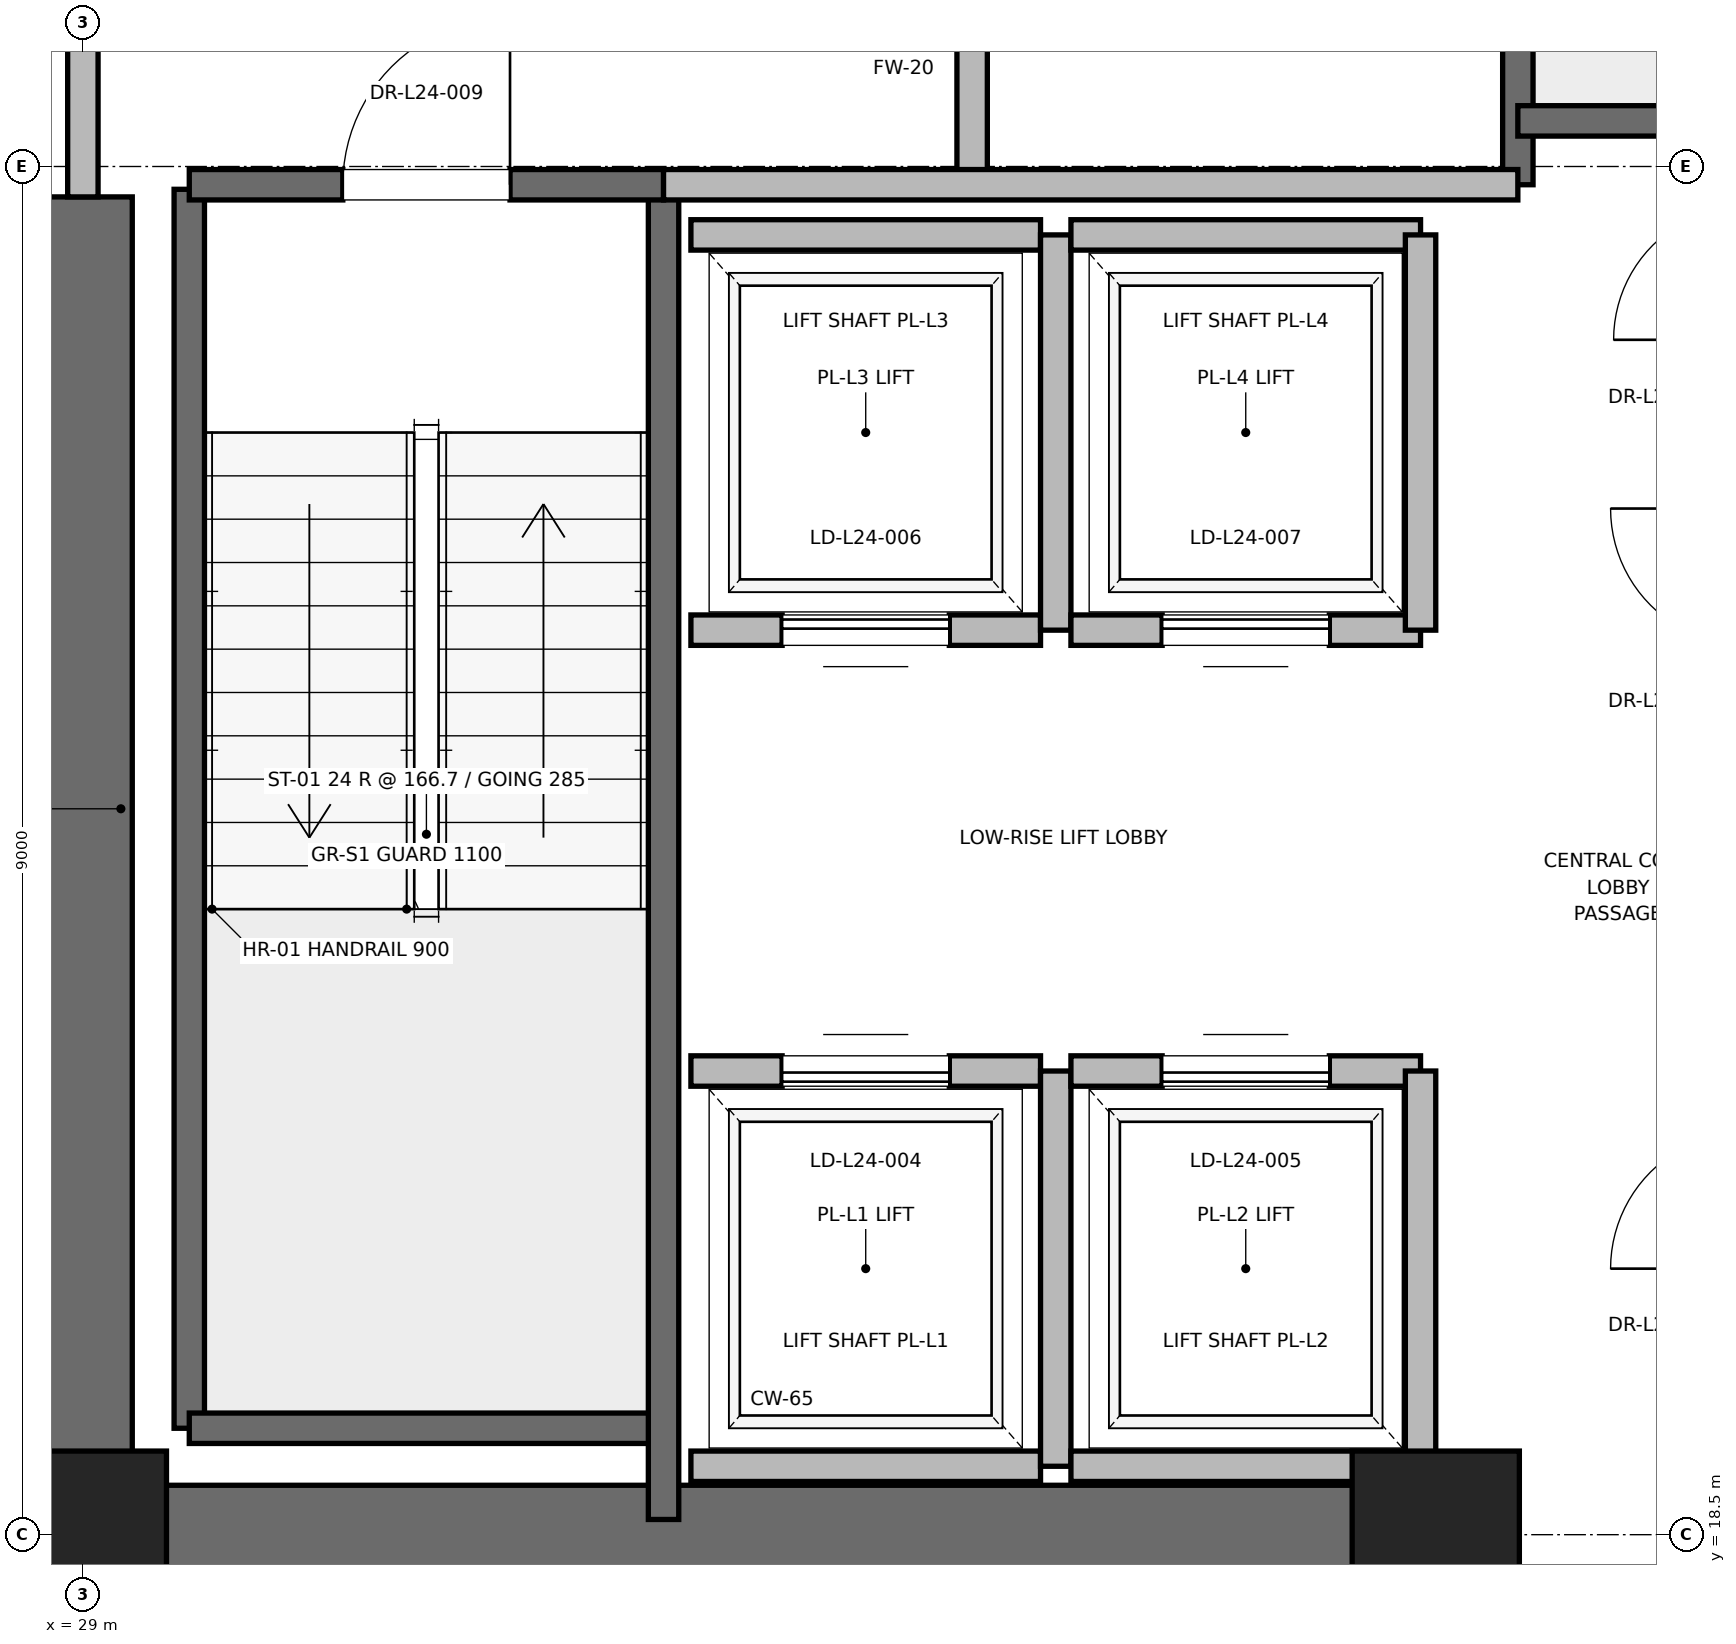
"""IFC4 building model, lengths in metres.
Left out: names, types, materials, properties, quantities, classifications, styles, units other than length and angle.
Written with IfcOpenShell. Run it as: python <this file> out.ifc"""

import sys

from ifc_helpers import new_model, si_unit, direction, frame, frame_2d, origin, origin_2d, place, context, subcontext, project, spatial, rectangle, extrude, element, fill, save


model = new_model("IFC4")
c1 = context("Model", 3, precision=1e-05, world=origin(), true_north=direction((0.0, 1.0)))
c2 = subcontext(c1, "Body", "Model", "MODEL_VIEW")
j1 = project(units=[si_unit("LENGTHUNIT", "METRE"), si_unit("PLANEANGLEUNIT", "RADIAN")], contexts=[c1])
p1 = place(None, origin())
s1 = spatial("IfcSite", under=j1, at=p1, CompositionType="ELEMENT")
p2 = place(p1, origin())
s2 = spatial("IfcBuilding", under=s1, at=p2, CompositionType="ELEMENT")
p3 = place(p2, frame((0.0, 0.0, 103.6)))
s3 = spatial("IfcBuildingStorey", under=s2, at=p3, CompositionType="ELEMENT", Elevation=103.6)
for number, where, z_axis, x_axis in (
    (1, (29.0, 18.5, 0.0), (0.0, 0.0, 1.0), (1.0, 0.0, 0.0)),
    (2, (37.9, 18.5, 0.0), (0.0, 0.0, 1.0), (1.0, 0.0, 0.0)),
):
    element("IfcColumn", number, at=place(p3, frame(where, z_axis=z_axis, x_axis=x_axis)), inside=s3, PredefinedType="PILASTER", context=c2, shape_type="SweptSolid", body=[
        extrude(rectangle(XDim=1.1, YDim=1.1, at=origin_2d()), origin(), (0.0, 0.0, 1.0), 4.0),
    ])
p4 = place(p3, frame((29.0, 18.5, 0.0), z_axis=(0.0, 0.0, 1.0), x_axis=(1.0, 0.0, 0.0)))
e3 = element("IfcWall", 3, at=p4, inside=s3, PredefinedType="SHEAR", context=c2, shape_type="SweptSolid", body=[
    extrude(rectangle(XDim=9.2, YDim=0.65, at=frame_2d((4.6, 0.0))), origin(), (0.0, 0.0, 1.0), 3.7),
])
p5 = place(p3, frame((29.0, 18.5, 0.0), z_axis=(0.0, 0.0, 1.0), x_axis=(0.0, 1.0, 0.0)))
e4 = element("IfcWall", 4, at=p5, inside=s3, PredefinedType="SHEAR", context=c2, shape_type="SweptSolid", body=[
    extrude(rectangle(XDim=8.8, YDim=0.65, at=frame_2d((4.4, 0.0))), origin(), (0.0, 0.0, 1.0), 3.7),
])
p6 = place(p3, frame((29.7, 19.2, 0.0), z_axis=(0.0, 0.0, 1.0), x_axis=(0.0, 1.0, 0.0)))
e5 = element("IfcWall", 5, at=p6, inside=s3, PredefinedType="SOLIDWALL", context=c2, shape_type="SweptSolid", body=[
    extrude(rectangle(XDim=8.15, YDim=0.2, at=frame_2d((4.075, 0.0))), origin(), (0.0, 0.0, 1.0), 3.7),
])
p7 = place(p3, frame((29.7, 19.2, 0.0), z_axis=(0.0, 0.0, 1.0), x_axis=(1.0, 0.0, 0.0)))
e6 = element("IfcWall", 6, at=p7, inside=s3, PredefinedType="SOLIDWALL", context=c2, shape_type="SweptSolid", body=[
    extrude(rectangle(XDim=3.12, YDim=0.2, at=frame_2d((1.56, 0.0))), origin(), (0.0, 0.0, 1.0), 3.7),
])
p8 = place(p3, frame((32.82, 18.6, 0.0), z_axis=(0.0, 0.0, 1.0), x_axis=(0.0, 1.0, 0.0)))
e7 = element("IfcWall", 7, at=p8, inside=s3, PredefinedType="SOLIDWALL", context=c2, shape_type="SweptSolid", body=[
    extrude(rectangle(XDim=8.78, YDim=0.2, at=frame_2d((4.39, 0.0))), origin(), (0.0, 0.0, 1.0), 3.7),
])
p9 = place(p3, frame((29.7, 27.38, 0.0), z_axis=(0.0, 0.0, 1.0), x_axis=(1.0, 0.0, 0.0)))
e8 = element("IfcWall", 8, at=p9, inside=s3, PredefinedType="SOLIDWALL", context=c2, shape_type="SweptSolid", body=[
    extrude(rectangle(XDim=3.12, YDim=0.2, at=frame_2d((1.56, 0.0))), origin(), (0.0, 0.0, 1.0), 3.7),
])
p10 = place(p9, frame((1.01, 0.0, 0.0)))
e9 = element("IfcOpeningElement", 9, at=p10, cuts=e8, PredefinedType="OPENING", context=c2, shape_type="SweptSolid", body=[
    extrude(rectangle(XDim=1.1, YDim=2.15, at=frame_2d((0.55, 1.075))), frame((0.0, 0.1, 0.0), z_axis=(0.0, -1.0, 0.0), x_axis=(1.0, 0.0, 0.0)), (0.0, 0.0, 1.0), 0.2),
])
p11 = place(p3, frame((38.44, 27.38, 0.0), z_axis=(0.0, 0.0, 1.0), x_axis=(0.0, 1.0, 0.0)))
e10 = element("IfcWall", 10, at=p11, inside=s3, PredefinedType="SOLIDWALL", context=c2, shape_type="SweptSolid", body=[
    extrude(rectangle(XDim=8.87, YDim=0.2, at=frame_2d((4.435, 0.0))), origin(), (0.0, 0.0, 1.0), 3.7),
])
p12 = place(p3, frame((38.44, 27.8, 0.0), z_axis=(0.0, 0.0, 1.0), x_axis=(1.0, 0.0, 0.0)))
e11 = element("IfcWall", 11, at=p12, inside=s3, PredefinedType="SOLIDWALL", context=c2, shape_type="SweptSolid", body=[
    extrude(rectangle(XDim=3.32, YDim=0.2, at=frame_2d((1.66, 0.0))), origin(), (0.0, 0.0, 1.0), 3.7),
])
p13 = place(p3, frame((34.85, 27.38, 0.0), z_axis=(0.0, 0.0, 1.0), x_axis=(0.0, 1.0, 0.0)))
e12 = element("IfcWall", 12, at=p13, inside=s3, PredefinedType="PARTITIONING", context=c2, shape_type="SweptSolid", body=[
    extrude(rectangle(XDim=3.37, YDim=0.2, at=frame_2d((1.685, 0.0))), origin(), (0.0, 0.0, 1.0), 3.7),
])
p14 = place(p13, frame((1.11, 0.0, 0.0)))
e13 = element("IfcOpeningElement", 13, at=p14, cuts=e12, PredefinedType="OPENING", context=c2, shape_type="SweptSolid", body=[
    extrude(rectangle(XDim=1.15, YDim=2.2, at=frame_2d((0.575, 1.1))), frame((0.0, 0.1, 0.0), z_axis=(0.0, -1.0, 0.0), x_axis=(1.0, 0.0, 0.0)), (0.0, 0.0, 1.0), 0.2),
])
p15 = place(p3, frame((29.0, 27.3, 0.0), z_axis=(0.0, 0.0, 1.0), x_axis=(0.0, 1.0, 0.0)))
e14 = element("IfcWall", 14, at=p15, inside=s3, PredefinedType="PARTITIONING", context=c2, shape_type="SweptSolid", body=[
    extrude(rectangle(XDim=3.4, YDim=0.2, at=frame_2d((1.7, 0.0))), origin(), (0.0, 0.0, 1.0), 2.48),
])
p16 = place(p15, frame((1.125, 0.0, 0.0)))
e15 = element("IfcOpeningElement", 15, at=p16, cuts=e14, PredefinedType="OPENING", context=c2, shape_type="SweptSolid", body=[
    extrude(rectangle(XDim=1.15, YDim=2.2, at=frame_2d((0.575, 1.1))), frame((0.0, 0.1, 0.0), z_axis=(0.0, -1.0, 0.0), x_axis=(1.0, 0.0, 0.0)), (0.0, 0.0, 1.0), 0.2),
])
p17 = place(p3, frame((32.82, 27.38, 0.0), z_axis=(0.0, 0.0, 1.0), x_axis=(1.0, 0.0, 0.0)))
e16 = element("IfcWall", 16, at=p17, inside=s3, PredefinedType="PARTITIONING", context=c2, shape_type="SweptSolid", body=[
    extrude(rectangle(XDim=5.62, YDim=0.2, at=frame_2d((2.81, 0.0))), origin(), (0.0, 0.0, 1.0), 3.7),
])
p18 = place(p3, frame((33.0, 18.95, 0.0), z_axis=(0.0, 0.0, 1.0), x_axis=(1.0, 0.0, 0.0)))
e17 = element("IfcWall", 17, at=p18, inside=s3, PredefinedType="SOLIDWALL", context=c2, shape_type="SweptSolid", body=[
    extrude(rectangle(XDim=2.3, YDim=0.2, at=frame_2d((1.15, 0.0))), origin(), (0.0, 0.0, 1.0), 3.7),
])
p19 = place(p3, frame((35.3, 21.55, 0.0), z_axis=(0.0, 0.0, 1.0), x_axis=(-1.0, 0.0, 0.0)))
e18 = element("IfcWall", 18, at=p19, inside=s3, PredefinedType="SOLIDWALL", context=c2, shape_type="SweptSolid", body=[
    extrude(rectangle(XDim=2.3, YDim=0.2, at=frame_2d((1.15, 0.0))), origin(), (0.0, 0.0, 1.0), 3.7),
])
p20 = place(p19, frame((0.6, 0.0, 0.0)))
e19 = element("IfcOpeningElement", 19, at=p20, cuts=e18, PredefinedType="OPENING", context=c2, shape_type="SweptSolid", body=[
    extrude(rectangle(XDim=1.1, YDim=2.2, at=frame_2d((0.55, 1.1))), frame((0.0, 0.1, 0.0), z_axis=(0.0, -1.0, 0.0), x_axis=(1.0, 0.0, 0.0)), (0.0, 0.0, 1.0), 0.2),
])
p21 = place(p3, frame((35.4, 18.95, 0.0), z_axis=(0.0, 0.0, 1.0), x_axis=(0.0, 1.0, 0.0)))
e20 = element("IfcWall", 20, at=p21, inside=s3, PredefinedType="SOLIDWALL", context=c2, shape_type="SweptSolid", body=[
    extrude(rectangle(XDim=2.6, YDim=0.2, at=frame_2d((1.3, 0.0))), origin(), (0.0, 0.0, 1.0), 3.7),
])
p22 = place(p3, frame((35.5, 18.95, 0.0), z_axis=(0.0, 0.0, 1.0), x_axis=(1.0, 0.0, 0.0)))
e21 = element("IfcWall", 21, at=p22, inside=s3, PredefinedType="SOLIDWALL", context=c2, shape_type="SweptSolid", body=[
    extrude(rectangle(XDim=2.3, YDim=0.2, at=frame_2d((1.15, 0.0))), origin(), (0.0, 0.0, 1.0), 2.48),
])
p23 = place(p3, frame((37.8, 21.55, 0.0), z_axis=(0.0, 0.0, 1.0), x_axis=(-1.0, 0.0, 0.0)))
e22 = element("IfcWall", 22, at=p23, inside=s3, PredefinedType="SOLIDWALL", context=c2, shape_type="SweptSolid", body=[
    extrude(rectangle(XDim=2.3, YDim=0.2, at=frame_2d((1.15, 0.0))), origin(), (0.0, 0.0, 1.0), 3.7),
])
p24 = place(p23, frame((0.6, 0.0, 0.0)))
e23 = element("IfcOpeningElement", 23, at=p24, cuts=e22, PredefinedType="OPENING", context=c2, shape_type="SweptSolid", body=[
    extrude(rectangle(XDim=1.1, YDim=2.2, at=frame_2d((0.55, 1.1))), frame((0.0, 0.1, 0.0), z_axis=(0.0, -1.0, 0.0), x_axis=(1.0, 0.0, 0.0)), (0.0, 0.0, 1.0), 0.2),
])
p25 = place(p3, frame((37.8, 18.95, 0.0), z_axis=(0.0, 0.0, 1.0), x_axis=(0.0, 1.0, 0.0)))
e24 = element("IfcWall", 24, at=p25, inside=s3, PredefinedType="SOLIDWALL", context=c2, shape_type="SweptSolid", body=[
    extrude(rectangle(XDim=2.6, YDim=0.2, at=frame_2d((1.3, 0.0))), origin(), (0.0, 0.0, 1.0), 2.48),
])
p26 = place(p3, frame((33.0, 24.45, 0.0), z_axis=(0.0, 0.0, 1.0), x_axis=(1.0, 0.0, 0.0)))
e25 = element("IfcWall", 25, at=p26, inside=s3, PredefinedType="SOLIDWALL", context=c2, shape_type="SweptSolid", body=[
    extrude(rectangle(XDim=2.3, YDim=0.2, at=frame_2d((1.15, 0.0))), origin(), (0.0, 0.0, 1.0), 3.7),
])
p27 = place(p26, frame((0.6, 0.0, 0.0)))
e26 = element("IfcOpeningElement", 26, at=p27, cuts=e25, PredefinedType="OPENING", context=c2, shape_type="SweptSolid", body=[
    extrude(rectangle(XDim=1.1, YDim=2.2, at=frame_2d((0.55, 1.1))), frame((0.0, 0.1, 0.0), z_axis=(0.0, -1.0, 0.0), x_axis=(1.0, 0.0, 0.0)), (0.0, 0.0, 1.0), 0.2),
])
p28 = place(p3, frame((35.3, 27.05, 0.0), z_axis=(0.0, 0.0, 1.0), x_axis=(-1.0, 0.0, 0.0)))
e27 = element("IfcWall", 27, at=p28, inside=s3, PredefinedType="SOLIDWALL", context=c2, shape_type="SweptSolid", body=[
    extrude(rectangle(XDim=2.3, YDim=0.2, at=frame_2d((1.15, 0.0))), origin(), (0.0, 0.0, 1.0), 3.7),
])
p29 = place(p3, frame((35.4, 24.45, 0.0), z_axis=(0.0, 0.0, 1.0), x_axis=(0.0, 1.0, 0.0)))
e28 = element("IfcWall", 28, at=p29, inside=s3, PredefinedType="SOLIDWALL", context=c2, shape_type="SweptSolid", body=[
    extrude(rectangle(XDim=2.6, YDim=0.2, at=frame_2d((1.3, 0.0))), origin(), (0.0, 0.0, 1.0), 3.7),
])
p30 = place(p3, frame((35.5, 24.45, 0.0), z_axis=(0.0, 0.0, 1.0), x_axis=(1.0, 0.0, 0.0)))
e29 = element("IfcWall", 29, at=p30, inside=s3, PredefinedType="SOLIDWALL", context=c2, shape_type="SweptSolid", body=[
    extrude(rectangle(XDim=2.3, YDim=0.2, at=frame_2d((1.15, 0.0))), origin(), (0.0, 0.0, 1.0), 3.7),
])
p31 = place(p30, frame((0.6, 0.0, 0.0)))
e30 = element("IfcOpeningElement", 30, at=p31, cuts=e29, PredefinedType="OPENING", context=c2, shape_type="SweptSolid", body=[
    extrude(rectangle(XDim=1.1, YDim=2.2, at=frame_2d((0.55, 1.1))), frame((0.0, 0.1, 0.0), z_axis=(0.0, -1.0, 0.0), x_axis=(1.0, 0.0, 0.0)), (0.0, 0.0, 1.0), 0.2),
])
p32 = place(p3, frame((37.8, 27.05, 0.0), z_axis=(0.0, 0.0, 1.0), x_axis=(-1.0, 0.0, 0.0)))
e31 = element("IfcWall", 31, at=p32, inside=s3, PredefinedType="SOLIDWALL", context=c2, shape_type="SweptSolid", body=[
    extrude(rectangle(XDim=2.3, YDim=0.2, at=frame_2d((1.15, 0.0))), origin(), (0.0, 0.0, 1.0), 3.7),
])
p33 = place(p3, frame((37.8, 24.45, 0.0), z_axis=(0.0, 0.0, 1.0), x_axis=(0.0, 1.0, 0.0)))
e32 = element("IfcWall", 32, at=p33, inside=s3, PredefinedType="SOLIDWALL", context=c2, shape_type="SweptSolid", body=[
    extrude(rectangle(XDim=2.6, YDim=0.2, at=frame_2d((1.3, 0.0))), origin(), (0.0, 0.0, 1.0), 3.7),
])
p34 = place(p10, origin())
e33 = element("IfcDoor", 33, at=p34, inside=s3, OperationType="SINGLE_SWING_RIGHT", PredefinedType="DOOR", context=c2, shape_type="SweptSolid", body=[
    extrude(rectangle(XDim=1.1, YDim=2.15, at=frame_2d((0.55, 1.075))), frame((0.0, 0.025, 0.0), z_axis=(0.0, -1.0, 0.0), x_axis=(1.0, 0.0, 0.0)), (0.0, 0.0, 1.0), 0.05),
])
fill(e9, e33)
p35 = place(p20, origin())
e34 = element("IfcDoor", 34, at=p35, inside=s3, OperationType="SLIDING_TO_RIGHT", PredefinedType="DOOR", context=c2, shape_type="SweptSolid", body=[
    extrude(rectangle(XDim=1.1, YDim=2.2, at=frame_2d((0.55, 1.1))), frame((0.0, 0.025, 0.0), z_axis=(0.0, -1.0, 0.0), x_axis=(1.0, 0.0, 0.0)), (0.0, 0.0, 1.0), 0.05),
])
fill(e19, e34)
p36 = place(p24, origin())
e35 = element("IfcDoor", 35, at=p36, inside=s3, OperationType="SLIDING_TO_RIGHT", PredefinedType="DOOR", context=c2, shape_type="SweptSolid", body=[
    extrude(rectangle(XDim=1.1, YDim=2.2, at=frame_2d((0.55, 1.1))), frame((0.0, 0.025, 0.0), z_axis=(0.0, -1.0, 0.0), x_axis=(1.0, 0.0, 0.0)), (0.0, 0.0, 1.0), 0.05),
])
fill(e23, e35)
p37 = place(p27, origin())
e36 = element("IfcDoor", 36, at=p37, inside=s3, OperationType="SLIDING_TO_RIGHT", PredefinedType="DOOR", context=c2, shape_type="SweptSolid", body=[
    extrude(rectangle(XDim=1.1, YDim=2.2, at=frame_2d((0.55, 1.1))), frame((0.0, 0.025, 0.0), z_axis=(0.0, -1.0, 0.0), x_axis=(1.0, 0.0, 0.0)), (0.0, 0.0, 1.0), 0.05),
])
fill(e26, e36)
p38 = place(p31, origin())
e37 = element("IfcDoor", 37, at=p38, inside=s3, OperationType="SLIDING_TO_RIGHT", PredefinedType="DOOR", context=c2, shape_type="SweptSolid", body=[
    extrude(rectangle(XDim=1.1, YDim=2.2, at=frame_2d((0.55, 1.1))), frame((0.0, 0.025, 0.0), z_axis=(0.0, -1.0, 0.0), x_axis=(1.0, 0.0, 0.0)), (0.0, 0.0, 1.0), 0.05),
])
fill(e30, e37)
save(model, sys.argv[1])
